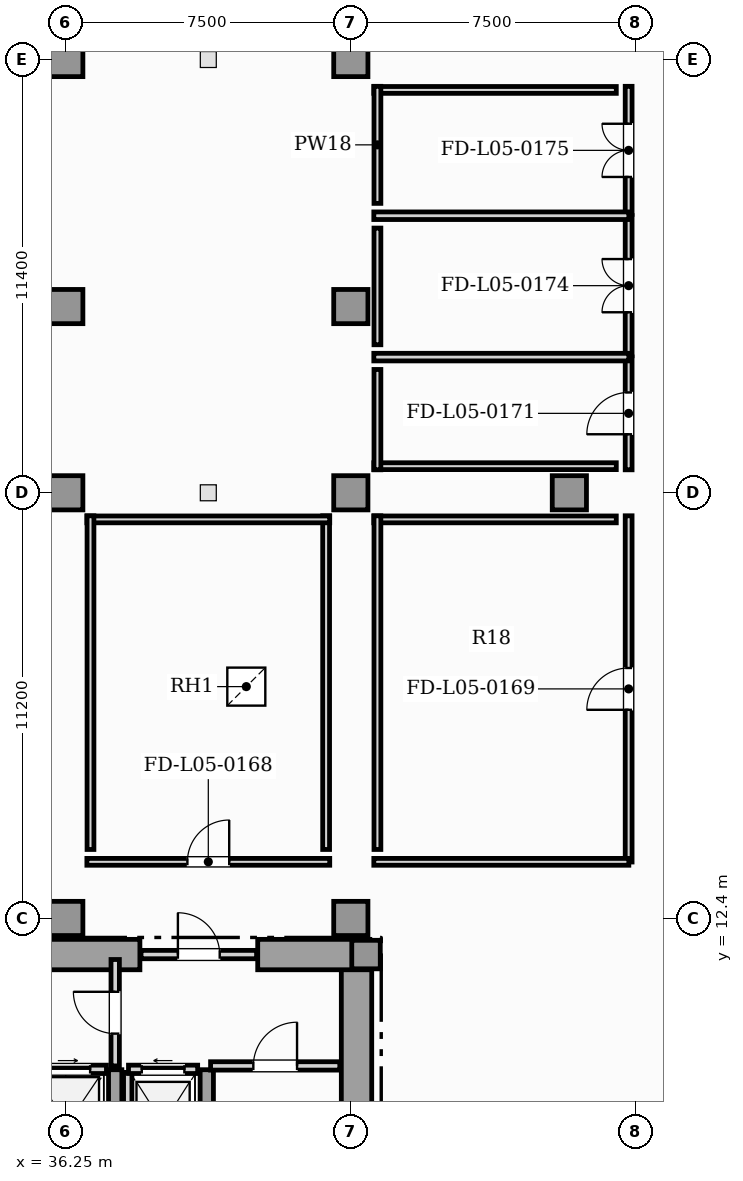
"""IFC4 building model, lengths in metres.
Left out: names, types, materials, properties, quantities, classifications, styles, units other than length and angle.
Written with IfcOpenShell. Run it as: python <this file> out.ifc"""

import sys

from ifc_helpers import new_model, si_unit, direction, frame, frame_2d, origin, origin_2d, place, context, subcontext, project, spatial, rectangle, extrude, element, fill, save


model = new_model("IFC4")
c1 = context("Model", 3, precision=1e-05, world=origin(), true_north=direction((0.0, 1.0)))
c2 = subcontext(c1, "Body", "Model", "MODEL_VIEW")
j1 = project(units=[si_unit("LENGTHUNIT", "METRE"), si_unit("PLANEANGLEUNIT", "RADIAN")], contexts=[c1])
p1 = place(None, origin())
s1 = spatial("IfcSite", under=j1, at=p1, CompositionType="ELEMENT")
p2 = place(p1, origin())
s2 = spatial("IfcBuilding", under=s1, at=p2, CompositionType="ELEMENT")
p3 = place(p2, frame((0.0, 0.0, 24.6)))
s3 = spatial("IfcBuildingStorey", under=s2, at=p3, CompositionType="ELEMENT", Elevation=24.6)
p4 = place(p3, frame((43.9, 0.92, 0.0), z_axis=(0.0, 0.0, 1.0), x_axis=(0.0, 1.0, 0.0)))
e1 = element("IfcWall", 1, at=p4, inside=s3, PredefinedType="SHEAR", context=c2, shape_type="SweptSolid", body=[
    extrude(rectangle(XDim=10.53, YDim=0.8, at=frame_2d((5.265, 0.0))), origin(), (0.0, 0.0, 1.0), 4.95),
])
p5 = place(p3, frame((30.9, 11.45, 0.0), z_axis=(0.0, 0.0, 1.0), x_axis=(1.0, 0.0, 0.0)))
e2 = element("IfcWall", 2, at=p5, inside=s3, PredefinedType="SHEAR", context=c2, shape_type="SweptSolid", body=[
    extrude(rectangle(XDim=7.3, YDim=0.8, at=frame_2d((3.65, 0.0))), origin(), (0.0, 0.0, 1.0), 4.95),
])
p6 = place(p3, frame((41.3, 11.45, 0.0), z_axis=(0.0, 0.0, 1.0), x_axis=(1.0, 0.0, 0.0)))
e3 = element("IfcWall", 3, at=p6, inside=s3, PredefinedType="SHEAR", context=c2, shape_type="SweptSolid", body=[
    extrude(rectangle(XDim=2.95, YDim=0.8, at=frame_2d((1.475, 0.0))), origin(), (0.0, 0.0, 1.0), 4.95),
])
for number, where, z_axis, x_axis in (
    (4, (37.55, 0.92, 0.0), (0.0, 0.0, 1.0), (0.0, 1.0, 0.0)),
    (5, (39.96, 0.92, 0.0), (0.0, 0.0, 1.0), (0.0, 1.0, 0.0)),
):
    element("IfcWall", number, at=place(p3, frame(where, z_axis=z_axis, x_axis=x_axis)), inside=s3, PredefinedType="SHEAR", context=c2, shape_type="SweptSolid", body=[
        extrude(rectangle(XDim=7.5, YDim=0.35, at=frame_2d((3.75, 0.0))), origin(), (0.0, 0.0, 1.0), 4.95),
    ])
p7 = place(p3, frame((44.15, 11.45, 0.0), z_axis=(0.0, 0.0, 1.0), x_axis=(1.0, 0.0, 0.0)))
e6 = element("IfcColumn", 6, at=p7, inside=s3, PredefinedType="COLUMN", context=c2, shape_type="SweptSolid", body=[
    extrude(rectangle(XDim=0.75, YDim=0.75, at=origin_2d()), origin(), (0.0, 0.0, 1.0), 5.2),
])
for number, where, z_axis, x_axis in (
    (7, (43.75, 12.4, 0.0), (0.0, 0.0, 1.0), (1.0, 0.0, 0.0)),
    (8, (43.75, 23.6, 0.0), (0.0, 0.0, 1.0), (1.0, 0.0, 0.0)),
    (9, (43.75, 35.0, 0.0), (0.0, 0.0, 1.0), (1.0, 0.0, 0.0)),
    (10, (36.25, 12.4, 0.0), (0.0, 0.0, 1.0), (1.0, 0.0, 0.0)),
    (11, (36.25, 23.6, 0.0), (0.0, 0.0, 1.0), (1.0, 0.0, 0.0)),
    (12, (49.5, 23.6, 0.0), (0.0, 0.0, 1.0), (1.0, 0.0, 0.0)),
    (13, (36.25, 28.5, 0.0), (0.0, 0.0, 1.0), (1.0, 0.0, 0.0)),
    (14, (43.75, 28.5, 0.0), (0.0, 0.0, 1.0), (1.0, 0.0, 0.0)),
    (15, (36.25, 35.0, 0.0), (0.0, 0.0, 1.0), (1.0, 0.0, 0.0)),
):
    element("IfcColumn", number, at=place(p3, frame(where, z_axis=z_axis, x_axis=x_axis)), inside=s3, PredefinedType="COLUMN", context=c2, shape_type="SweptSolid", body=[
        extrude(rectangle(XDim=0.9, YDim=0.9, at=origin_2d()), origin(), (0.0, 0.0, 1.0), 5.2),
    ])
p8 = place(p3, frame((37.88, 5.65, 0.0), z_axis=(0.0, 0.0, 1.0), x_axis=(0.0, 1.0, 0.0)))
e16 = element("IfcWall", 16, at=p8, inside=s3, PredefinedType="SOLIDWALL", context=c2, shape_type="SweptSolid", body=[
    extrude(rectangle(XDim=2.7, YDim=0.22, at=frame_2d((1.35, 0.0))), origin(), (0.0, 0.0, 1.0), 4.95),
])
p9 = place(p3, frame((37.9, 8.43, 0.0), z_axis=(0.0, 0.0, 1.0), x_axis=(1.0, 0.0, 0.0)))
e17 = element("IfcWall", 17, at=p9, inside=s3, PredefinedType="SOLIDWALL", context=c2, shape_type="SweptSolid", body=[
    extrude(rectangle(XDim=1.82, YDim=0.22, at=frame_2d((0.91, 0.0))), origin(), (0.0, 0.0, 1.0), 4.95),
])
p10 = place(p9, frame((0.35, 0.0, 0.0)))
e18 = element("IfcOpeningElement", 18, at=p10, cuts=e17, PredefinedType="OPENING", context=c2, shape_type="SweptSolid", body=[
    extrude(rectangle(XDim=1.12, YDim=2.25, at=frame_2d((0.56, 1.125))), frame((0.0, 0.12, 0.0), z_axis=(0.0, -1.0, 0.0), x_axis=(1.0, 0.0, 0.0)), (0.0, 0.0, 1.0), 0.24),
])
p11 = place(p3, frame((35.28, 8.43, 0.0), z_axis=(0.0, 0.0, 1.0), x_axis=(1.0, 0.0, 0.0)))
e19 = element("IfcWall", 19, at=p11, inside=s3, PredefinedType="SOLIDWALL", context=c2, shape_type="SweptSolid", body=[
    extrude(rectangle(XDim=2.04, YDim=0.22, at=frame_2d((1.02, 0.0))), origin(), (0.0, 0.0, 1.0), 4.95),
])
p12 = place(p11, frame((0.43, 0.0, 0.0)))
e20 = element("IfcOpeningElement", 20, at=p12, cuts=e19, PredefinedType="OPENING", context=c2, shape_type="SweptSolid", body=[
    extrude(rectangle(XDim=1.18, YDim=2.2, at=frame_2d((0.59, 1.1))), frame((0.0, 0.12, 0.0), z_axis=(0.0, -1.0, 0.0), x_axis=(1.0, 0.0, 0.0)), (0.0, 0.0, 1.0), 0.24),
])
p13 = place(p3, frame((40.06, 8.52, 0.0), z_axis=(0.0, 0.0, 1.0), x_axis=(1.0, 0.0, 0.0)))
e21 = element("IfcWall", 21, at=p13, inside=s3, PredefinedType="SOLIDWALL", context=c2, shape_type="SweptSolid", body=[
    extrude(rectangle(XDim=3.4, YDim=0.22, at=frame_2d((1.7, 0.0))), origin(), (0.0, 0.0, 1.0), 4.95),
])
p14 = place(p13, frame((1.125, 0.0, 0.0)))
e22 = element("IfcOpeningElement", 22, at=p14, cuts=e21, PredefinedType="OPENING", context=c2, shape_type="SweptSolid", body=[
    extrude(rectangle(XDim=1.15, YDim=2.2, at=frame_2d((0.575, 1.1))), frame((0.0, 0.12, 0.0), z_axis=(0.0, -1.0, 0.0), x_axis=(1.0, 0.0, 0.0)), (0.0, 0.0, 1.0), 0.24),
])
p15 = place(p3, frame((37.55, 8.52, 0.0), z_axis=(0.0, 0.0, 1.0), x_axis=(0.0, 1.0, 0.0)))
e23 = element("IfcWall", 23, at=p15, inside=s3, PredefinedType="SOLIDWALL", context=c2, shape_type="SweptSolid", body=[
    extrude(rectangle(XDim=2.8, YDim=0.22, at=frame_2d((1.4, 0.0))), origin(), (0.0, 0.0, 1.0), 4.406),
])
p16 = place(p15, frame((0.85, 0.0, 0.0)))
e24 = element("IfcOpeningElement", 24, at=p16, cuts=e23, PredefinedType="OPENING", context=c2, shape_type="SweptSolid", body=[
    extrude(rectangle(XDim=1.1, YDim=2.2, at=frame_2d((0.55, 1.1))), frame((0.0, 0.12, 0.0), z_axis=(0.0, -1.0, 0.0), x_axis=(1.0, 0.0, 0.0)), (0.0, 0.0, 1.0), 0.24),
])
p17 = place(p3, frame((38.23, 11.45, 0.0), z_axis=(0.0, 0.0, 1.0), x_axis=(1.0, 0.0, 0.0)))
e25 = element("IfcWall", 25, at=p17, inside=s3, PredefinedType="SOLIDWALL", context=c2, shape_type="SweptSolid", body=[
    extrude(rectangle(XDim=3.04, YDim=0.22, at=frame_2d((1.52, 0.0))), origin(), (0.0, 0.0, 1.0), 4.95),
])
p18 = place(p17, frame((0.97, 0.0, 0.0)))
e26 = element("IfcOpeningElement", 26, at=p18, cuts=e25, PredefinedType="OPENING", context=c2, shape_type="SweptSolid", body=[
    extrude(rectangle(XDim=1.1, YDim=2.2, at=frame_2d((0.55, 1.1))), frame((0.0, 0.12, 0.0), z_axis=(0.0, -1.0, 0.0), x_axis=(1.0, 0.0, 0.0)), (0.0, 0.0, 1.0), 0.24),
])
p19 = place(p3, frame((36.805, 13.89, 0.0), z_axis=(0.0, 0.0, 1.0), x_axis=(1.0, 0.0, 0.0)))
e27 = element("IfcWall", 27, at=p19, inside=s3, PredefinedType="PARTITIONING", context=c2, shape_type="SweptSolid", body=[
    extrude(rectangle(XDim=6.39, YDim=0.18, at=frame_2d((3.195, 0.0))), origin(), (0.0, 0.0, 1.0), 4.95),
])
p20 = place(p19, frame((2.645, 0.0, 0.0)))
e28 = element("IfcOpeningElement", 28, at=p20, cuts=e27, PredefinedType="OPENING", context=c2, shape_type="SweptSolid", body=[
    extrude(rectangle(XDim=1.1, YDim=2.2, at=frame_2d((0.55, 1.1))), frame((0.0, 0.1, 0.0), z_axis=(0.0, -1.0, 0.0), x_axis=(1.0, 0.0, 0.0)), (0.0, 0.0, 1.0), 0.2),
])
p21 = place(p3, frame((51.06, 13.885, 0.0), z_axis=(0.0, 0.0, 1.0), x_axis=(0.0, 1.0, 0.0)))
e29 = element("IfcWall", 29, at=p21, inside=s3, PredefinedType="PARTITIONING", context=c2, shape_type="SweptSolid", body=[
    extrude(rectangle(XDim=9.11, YDim=0.18, at=frame_2d((4.555, 0.0))), origin(), (0.0, 0.0, 1.0), 4.95),
])
p22 = place(p21, frame((4.005, 0.0, 0.0)))
e30 = element("IfcOpeningElement", 30, at=p22, cuts=e29, PredefinedType="OPENING", context=c2, shape_type="SweptSolid", body=[
    extrude(rectangle(XDim=1.1, YDim=2.2, at=frame_2d((0.55, 1.1))), frame((0.0, 0.1, 0.0), z_axis=(0.0, -1.0, 0.0), x_axis=(1.0, 0.0, 0.0)), (0.0, 0.0, 1.0), 0.2),
])
p23 = place(p3, frame((44.355, 13.89, 0.0), z_axis=(0.0, 0.0, 1.0), x_axis=(1.0, 0.0, 0.0)))
e31 = element("IfcWall", 31, at=p23, inside=s3, PredefinedType="PARTITIONING", context=c2, shape_type="SweptSolid", body=[
    extrude(rectangle(XDim=6.71, YDim=0.18, at=frame_2d((3.355, 0.0))), origin(), (0.0, 0.0, 1.0), 4.95),
])
p24 = place(p3, frame((51.06, 24.205, 0.0), z_axis=(0.0, 0.0, 1.0), x_axis=(0.0, 1.0, 0.0)))
e32 = element("IfcWall", 32, at=p24, inside=s3, PredefinedType="PARTITIONING", context=c2, shape_type="SweptSolid", body=[
    extrude(rectangle(XDim=2.97, YDim=0.18, at=frame_2d((1.485, 0.0))), origin(), (0.0, 0.0, 1.0), 4.95),
])
p25 = place(p24, frame((0.935, 0.0, 0.0)))
e33 = element("IfcOpeningElement", 33, at=p25, cuts=e32, PredefinedType="OPENING", context=c2, shape_type="SweptSolid", body=[
    extrude(rectangle(XDim=1.1, YDim=2.2, at=frame_2d((0.55, 1.1))), frame((0.0, 0.1, 0.0), z_axis=(0.0, -1.0, 0.0), x_axis=(1.0, 0.0, 0.0)), (0.0, 0.0, 1.0), 0.2),
])
p26 = place(p3, frame((51.06, 27.205, 0.0), z_axis=(0.0, 0.0, 1.0), x_axis=(0.0, 1.0, 0.0)))
e34 = element("IfcWall", 34, at=p26, inside=s3, PredefinedType="PARTITIONING", context=c2, shape_type="SweptSolid", body=[
    extrude(rectangle(XDim=3.69, YDim=0.18, at=frame_2d((1.845, 0.0))), origin(), (0.0, 0.0, 1.0), 4.95),
])
p27 = place(p26, frame((1.145, 0.0, 0.0)))
e35 = element("IfcOpeningElement", 35, at=p27, cuts=e34, PredefinedType="OPENING", context=c2, shape_type="SweptSolid", body=[
    extrude(rectangle(XDim=1.4, YDim=2.2, at=frame_2d((0.7, 1.1))), frame((0.0, 0.1, 0.0), z_axis=(0.0, -1.0, 0.0), x_axis=(1.0, 0.0, 0.0)), (0.0, 0.0, 1.0), 0.2),
])
p28 = place(p3, frame((51.06, 30.925, 0.0), z_axis=(0.0, 0.0, 1.0), x_axis=(0.0, 1.0, 0.0)))
e36 = element("IfcWall", 36, at=p28, inside=s3, PredefinedType="PARTITIONING", context=c2, shape_type="SweptSolid", body=[
    extrude(rectangle(XDim=3.37, YDim=0.18, at=frame_2d((1.685, 0.0))), origin(), (0.0, 0.0, 1.0), 4.95),
])
p29 = place(p28, frame((0.985, 0.0, 0.0)))
e37 = element("IfcOpeningElement", 37, at=p29, cuts=e36, PredefinedType="OPENING", context=c2, shape_type="SweptSolid", body=[
    extrude(rectangle(XDim=1.4, YDim=2.2, at=frame_2d((0.7, 1.1))), frame((0.0, 0.1, 0.0), z_axis=(0.0, -1.0, 0.0), x_axis=(1.0, 0.0, 0.0)), (0.0, 0.0, 1.0), 0.2),
])
for number, where, z_axis, x_axis in (
    (38, (44.355, 27.17, 0.0), (0.0, 0.0, 1.0), (1.0, 0.0, 0.0)),
    (39, (44.355, 30.89, 0.0), (0.0, 0.0, 1.0), (1.0, 0.0, 0.0)),
):
    element("IfcWall", number, at=place(p3, frame(where, z_axis=z_axis, x_axis=x_axis)), inside=s3, PredefinedType="PARTITIONING", context=c2, shape_type="SweptSolid", body=[
        extrude(rectangle(XDim=6.71, YDim=0.2, at=frame_2d((3.355, 0.0))), origin(), (0.0, 0.0, 1.0), 4.95),
    ])
p30 = place(p3, frame((43.1, 14.215, 0.0), z_axis=(0.0, 0.0, 1.0), x_axis=(0.0, 1.0, 0.0)))
e40 = element("IfcWall", 40, at=p30, inside=s3, PredefinedType="PARTITIONING", context=c2, shape_type="SweptSolid", body=[
    extrude(rectangle(XDim=8.78, YDim=0.18, at=frame_2d((4.39, 0.0))), origin(), (0.0, 0.0, 1.0), 4.95),
])
p31 = place(p3, frame((43.195, 22.9, 0.0), z_axis=(0.0, 0.0, 1.0), x_axis=(-1.0, 0.0, 0.0)))
e41 = element("IfcWall", 41, at=p31, inside=s3, PredefinedType="PARTITIONING", context=c2, shape_type="SweptSolid", body=[
    extrude(rectangle(XDim=6.39, YDim=0.18, at=frame_2d((3.195, 0.0))), origin(), (0.0, 0.0, 1.0), 4.95),
])
p32 = place(p3, frame((36.9, 22.995, 0.0), z_axis=(0.0, 0.0, 1.0), x_axis=(0.0, -1.0, 0.0)))
e42 = element("IfcWall", 42, at=p32, inside=s3, PredefinedType="PARTITIONING", context=c2, shape_type="SweptSolid", body=[
    extrude(rectangle(XDim=8.78, YDim=0.18, at=frame_2d((4.39, 0.0))), origin(), (0.0, 0.0, 1.0), 4.95),
])
p33 = place(p3, frame((50.735, 22.9, 0.0), z_axis=(0.0, 0.0, 1.0), x_axis=(-1.0, 0.0, 0.0)))
e43 = element("IfcWall", 43, at=p33, inside=s3, PredefinedType="PARTITIONING", context=c2, shape_type="SweptSolid", body=[
    extrude(rectangle(XDim=6.38, YDim=0.18, at=frame_2d((3.19, 0.0))), origin(), (0.0, 0.0, 1.0), 4.95),
])
p34 = place(p3, frame((44.45, 22.995, 0.0), z_axis=(0.0, 0.0, 1.0), x_axis=(0.0, -1.0, 0.0)))
e44 = element("IfcWall", 44, at=p34, inside=s3, PredefinedType="PARTITIONING", context=c2, shape_type="SweptSolid", body=[
    extrude(rectangle(XDim=8.78, YDim=0.18, at=frame_2d((4.39, 0.0))), origin(), (0.0, 0.0, 1.0), 4.95),
])
p35 = place(p3, frame((44.355, 24.3, 0.0), z_axis=(0.0, 0.0, 1.0), x_axis=(1.0, 0.0, 0.0)))
e45 = element("IfcWall", 45, at=p35, inside=s3, PredefinedType="PARTITIONING", context=c2, shape_type="SweptSolid", body=[
    extrude(rectangle(XDim=6.38, YDim=0.18, at=frame_2d((3.19, 0.0))), origin(), (0.0, 0.0, 1.0), 4.95),
])
p36 = place(p3, frame((44.45, 26.845, 0.0), z_axis=(0.0, 0.0, 1.0), x_axis=(0.0, -1.0, 0.0)))
e46 = element("IfcWall", 46, at=p36, inside=s3, PredefinedType="PARTITIONING", context=c2, shape_type="SweptSolid", body=[
    extrude(rectangle(XDim=2.64, YDim=0.18, at=frame_2d((1.32, 0.0))), origin(), (0.0, 0.0, 1.0), 4.95),
])
p37 = place(p3, frame((44.45, 30.565, 0.0), z_axis=(0.0, 0.0, 1.0), x_axis=(0.0, -1.0, 0.0)))
e47 = element("IfcWall", 47, at=p37, inside=s3, PredefinedType="PARTITIONING", context=c2, shape_type="SweptSolid", body=[
    extrude(rectangle(XDim=3.07, YDim=0.18, at=frame_2d((1.535, 0.0))), origin(), (0.0, 0.0, 1.0), 4.95),
])
p38 = place(p3, frame((50.735, 34.2, 0.0), z_axis=(0.0, 0.0, 1.0), x_axis=(-1.0, 0.0, 0.0)))
e48 = element("IfcWall", 48, at=p38, inside=s3, PredefinedType="PARTITIONING", context=c2, shape_type="SweptSolid", body=[
    extrude(rectangle(XDim=6.38, YDim=0.18, at=frame_2d((3.19, 0.0))), origin(), (0.0, 0.0, 1.0), 4.95),
])
p39 = place(p3, frame((44.45, 34.295, 0.0), z_axis=(0.0, 0.0, 1.0), x_axis=(0.0, -1.0, 0.0)))
e49 = element("IfcWall", 49, at=p39, inside=s3, PredefinedType="PARTITIONING", context=c2, shape_type="SweptSolid", body=[
    extrude(rectangle(XDim=3.08, YDim=0.18, at=frame_2d((1.54, 0.0))), origin(), (0.0, 0.0, 1.0), 4.95),
])
p40 = place(p3, frame((0.0, 0.0, -0.4)))
p41 = place(p40, frame((41.0, 18.5, 0.35)))
e50 = element("IfcDoor", 50, at=p41, inside=s3, OperationType="SINGLE_SWING_LEFT", PredefinedType="TRAPDOOR", context=c2, shape_type="SweptSolid", body=[
    extrude(rectangle(XDim=1.0, YDim=1.0, at=origin_2d()), origin(), (0.0, 0.0, 1.0), 0.05),
])
p42 = place(p10, origin())
e51 = element("IfcDoor", 51, at=p42, inside=s3, OperationType="SLIDING_TO_LEFT", PredefinedType="DOOR", context=c2, shape_type="SweptSolid", body=[
    extrude(rectangle(XDim=1.12, YDim=2.25, at=frame_2d((0.56, 1.125))), frame((0.0, 0.025, 0.0), z_axis=(0.0, -1.0, 0.0), x_axis=(1.0, 0.0, 0.0)), (0.0, 0.0, 1.0), 0.05),
])
fill(e18, e51)
p43 = place(p12, origin())
e52 = element("IfcDoor", 52, at=p43, inside=s3, OperationType="SLIDING_TO_RIGHT", PredefinedType="DOOR", context=c2, shape_type="SweptSolid", body=[
    extrude(rectangle(XDim=1.18, YDim=2.2, at=frame_2d((0.59, 1.1))), frame((0.0, 0.025, 0.0), z_axis=(0.0, -1.0, 0.0), x_axis=(1.0, 0.0, 0.0)), (0.0, 0.0, 1.0), 0.05),
])
fill(e20, e52)
p44 = place(p14, origin())
e53 = element("IfcDoor", 53, at=p44, inside=s3, OperationType="SINGLE_SWING_RIGHT", PredefinedType="DOOR", context=c2, shape_type="SweptSolid", body=[
    extrude(rectangle(XDim=1.15, YDim=2.2, at=frame_2d((0.575, 1.1))), frame((0.0, 0.025, 0.0), z_axis=(0.0, -1.0, 0.0), x_axis=(1.0, 0.0, 0.0)), (0.0, 0.0, 1.0), 0.05),
])
fill(e22, e53)
p45 = place(p16, origin())
e54 = element("IfcDoor", 54, at=p45, inside=s3, OperationType="SINGLE_SWING_RIGHT", PredefinedType="DOOR", context=c2, shape_type="SweptSolid", body=[
    extrude(rectangle(XDim=1.1, YDim=2.2, at=frame_2d((0.55, 1.1))), frame((0.0, 0.025, 0.0), z_axis=(0.0, -1.0, 0.0), x_axis=(1.0, 0.0, 0.0)), (0.0, 0.0, 1.0), 0.05),
])
fill(e24, e54)
p46 = place(p18, origin())
e55 = element("IfcDoor", 55, at=p46, inside=s3, OperationType="SINGLE_SWING_LEFT", PredefinedType="DOOR", context=c2, shape_type="SweptSolid", body=[
    extrude(rectangle(XDim=1.1, YDim=2.2, at=frame_2d((0.55, 1.1))), frame((0.0, 0.025, 0.0), z_axis=(0.0, -1.0, 0.0), x_axis=(1.0, 0.0, 0.0)), (0.0, 0.0, 1.0), 0.05),
])
fill(e26, e55)
p47 = place(p20, origin())
e56 = element("IfcDoor", 56, at=p47, inside=s3, OperationType="SINGLE_SWING_RIGHT", PredefinedType="DOOR", context=c2, shape_type="SweptSolid", body=[
    extrude(rectangle(XDim=1.1, YDim=2.2, at=frame_2d((0.55, 1.1))), frame((0.0, 0.025, 0.0), z_axis=(0.0, -1.0, 0.0), x_axis=(1.0, 0.0, 0.0)), (0.0, 0.0, 1.0), 0.05),
])
fill(e28, e56)
p48 = place(p22, origin())
e57 = element("IfcDoor", 57, at=p48, inside=s3, OperationType="SINGLE_SWING_LEFT", PredefinedType="DOOR", context=c2, shape_type="SweptSolid", body=[
    extrude(rectangle(XDim=1.1, YDim=2.2, at=frame_2d((0.55, 1.1))), frame((0.0, 0.025, 0.0), z_axis=(0.0, -1.0, 0.0), x_axis=(1.0, 0.0, 0.0)), (0.0, 0.0, 1.0), 0.05),
])
fill(e30, e57)
p49 = place(p25, origin())
e58 = element("IfcDoor", 58, at=p49, inside=s3, OperationType="SINGLE_SWING_LEFT", PredefinedType="DOOR", context=c2, shape_type="SweptSolid", body=[
    extrude(rectangle(XDim=1.1, YDim=2.2, at=frame_2d((0.55, 1.1))), frame((0.0, 0.025, 0.0), z_axis=(0.0, -1.0, 0.0), x_axis=(1.0, 0.0, 0.0)), (0.0, 0.0, 1.0), 0.05),
])
fill(e33, e58)
p50 = place(p27, origin())
e59 = element("IfcDoor", 59, at=p50, inside=s3, OperationType="DOUBLE_DOOR_SINGLE_SWING", PredefinedType="DOOR", context=c2, shape_type="SweptSolid", body=[
    extrude(rectangle(XDim=1.4, YDim=2.2, at=frame_2d((0.7, 1.1))), frame((0.0, 0.025, 0.0), z_axis=(0.0, -1.0, 0.0), x_axis=(1.0, 0.0, 0.0)), (0.0, 0.0, 1.0), 0.05),
])
fill(e35, e59)
p51 = place(p29, origin())
e60 = element("IfcDoor", 60, at=p51, inside=s3, OperationType="DOUBLE_DOOR_SINGLE_SWING", PredefinedType="DOOR", context=c2, shape_type="SweptSolid", body=[
    extrude(rectangle(XDim=1.4, YDim=2.2, at=frame_2d((0.7, 1.1))), frame((0.0, 0.025, 0.0), z_axis=(0.0, -1.0, 0.0), x_axis=(1.0, 0.0, 0.0)), (0.0, 0.0, 1.0), 0.05),
])
fill(e37, e60)
save(model, sys.argv[1])
